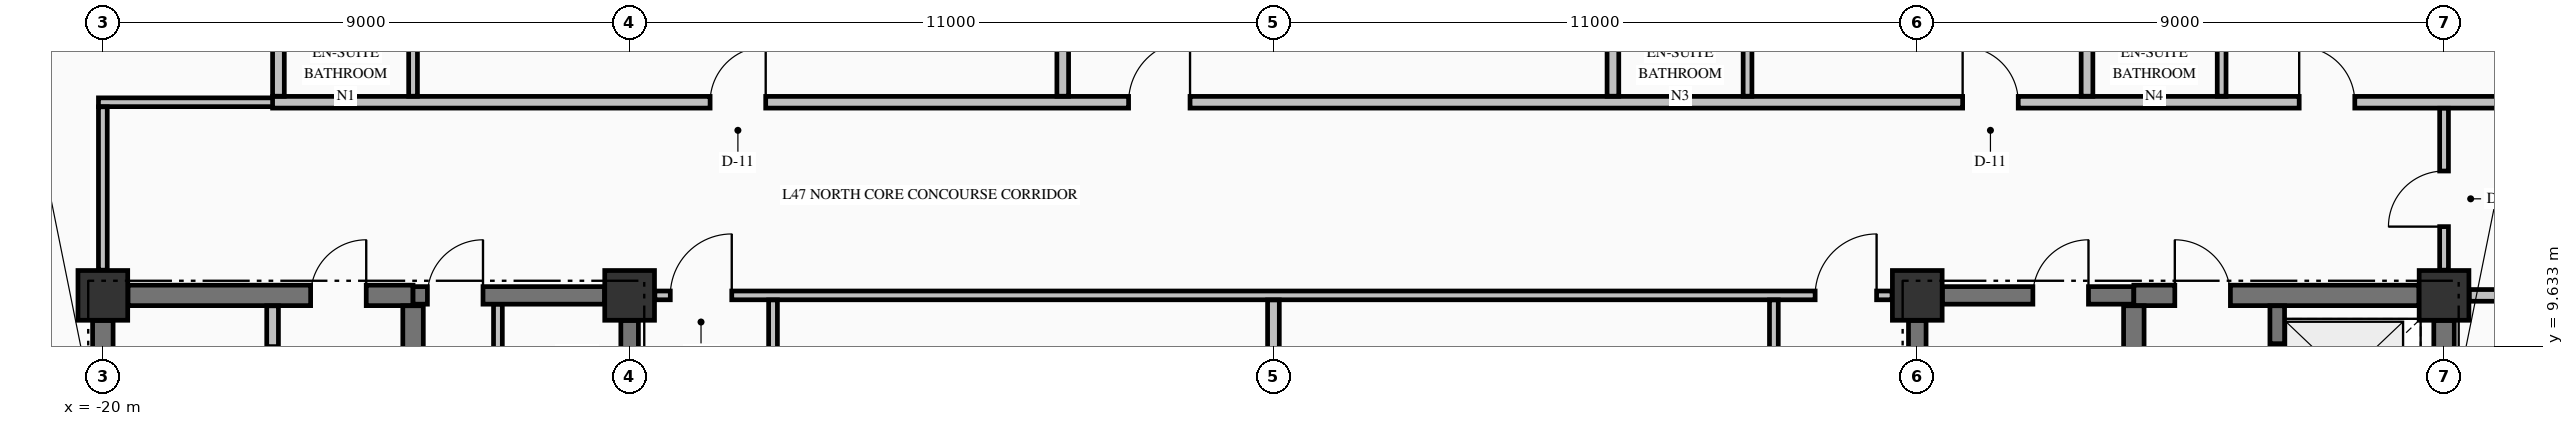
"""IFC4 building model, lengths in metres.
Left out: names, types, materials, properties, quantities, classifications, styles, units other than length and angle.
Written with IfcOpenShell. Run it as: python <this file> out.ifc"""

import sys

from ifc_helpers import new_model, si_unit, direction, frame, frame_2d, origin, origin_2d, place, context, subcontext, project, spatial, rectangle, extrude, element, fill, save


model = new_model("IFC4")
c1 = context("Model", 3, precision=1e-05, world=origin(), true_north=direction((0.0, 1.0)))
c2 = subcontext(c1, "Body", "Model", "MODEL_VIEW")
j1 = project(units=[si_unit("LENGTHUNIT", "METRE"), si_unit("PLANEANGLEUNIT", "RADIAN")], contexts=[c1])
p1 = place(None, origin())
s1 = spatial("IfcSite", under=j1, at=p1, CompositionType="ELEMENT")
p2 = place(p1, origin())
s2 = spatial("IfcBuilding", under=s1, at=p2, CompositionType="ELEMENT")
p3 = place(p2, frame((0.0, 0.0, 183.06)))
s3 = spatial("IfcBuildingStorey", under=s2, at=p3, CompositionType="ELEMENT", Elevation=183.06)
for number, where, z_axis, x_axis in (
    (1, (-20.0, 10.5, -0.25), (0.0, 0.0, 1.0), (1.0, 0.0, 0.0)),
    (2, (-11.0, 10.5, -0.25), (0.0, 0.0, 1.0), (1.0, 0.0, 0.0)),
    (3, (11.0, 10.5, -0.25), (0.0, 0.0, 1.0), (1.0, 0.0, 0.0)),
    (4, (20.0, 10.5, -0.25), (0.0, 0.0, 1.0), (1.0, 0.0, 0.0)),
):
    element("IfcColumn", number, at=place(p3, frame(where, z_axis=z_axis, x_axis=x_axis)), inside=s3, PredefinedType="COLUMN", context=c2, shape_type="SweptSolid", body=[
        extrude(rectangle(XDim=0.85, YDim=0.85, at=origin_2d()), origin(), (0.0, 0.0, 1.0), 3.225),
    ])
p4 = place(p3, frame((-19.571, 10.5, 0.0), z_axis=(0.0, 0.0, 1.0), x_axis=(1.0, 0.0, 0.0)))
e5 = element("IfcWall", 5, at=p4, inside=s3, PredefinedType="SHEAR", context=c2, shape_type="SweptSolid", body=[
    extrude(rectangle(XDim=4.871, YDim=0.35, at=frame_2d((2.436, 0.0))), origin(), (0.0, 0.0, 1.0), 2.975),
])
p5 = place(p4, frame((3.121, 0.0, 0.0)))
e6 = element("IfcOpeningElement", 6, at=p5, cuts=e5, PredefinedType="OPENING", context=c2, shape_type="SweptSolid", body=[
    extrude(rectangle(XDim=0.95, YDim=2.02, at=frame_2d((0.475, 1.01))), frame((0.0, 0.185, 0.0), z_axis=(0.0, -1.0, 0.0), x_axis=(1.0, 0.0, 0.0)), (0.0, 0.0, 1.0), 0.37),
])
p6 = place(p3, frame((-14.7, 10.5, 0.0), z_axis=(0.0, 0.0, 1.0), x_axis=(1.0, 0.0, 0.0)))
e7 = element("IfcWall", 7, at=p6, inside=s3, PredefinedType="SHEAR", context=c2, shape_type="SweptSolid", body=[
    extrude(rectangle(XDim=3.271, YDim=0.3, at=frame_2d((1.635, 0.0))), origin(), (0.0, 0.0, 1.0), 2.975),
])
p7 = place(p6, frame((0.245, 0.0, 0.0)))
e8 = element("IfcOpeningElement", 8, at=p7, cuts=e7, PredefinedType="OPENING", context=c2, shape_type="SweptSolid", body=[
    extrude(rectangle(XDim=0.95, YDim=2.02, at=frame_2d((0.475, 1.01))), frame((0.0, 0.16, 0.0), z_axis=(0.0, -1.0, 0.0), x_axis=(1.0, 0.0, 0.0)), (0.0, 0.0, 1.0), 0.32),
])
p8 = place(p3, frame((11.429, 10.5, 0.0), z_axis=(0.0, 0.0, 1.0), x_axis=(1.0, 0.0, 0.0)))
e9 = element("IfcWall", 9, at=p8, inside=s3, PredefinedType="SHEAR", context=c2, shape_type="SweptSolid", body=[
    extrude(rectangle(XDim=3.271, YDim=0.3, at=frame_2d((1.635, 0.0))), origin(), (0.0, 0.0, 1.0), 2.975),
])
p9 = place(p8, frame((1.546, 0.0, 0.0)))
e10 = element("IfcOpeningElement", 10, at=p9, cuts=e9, PredefinedType="OPENING", context=c2, shape_type="SweptSolid", body=[
    extrude(rectangle(XDim=0.95, YDim=2.02, at=frame_2d((0.475, 1.01))), frame((0.0, 0.16, 0.0), z_axis=(0.0, -1.0, 0.0), x_axis=(1.0, 0.0, 0.0)), (0.0, 0.0, 1.0), 0.32),
])
p10 = place(p3, frame((14.7, 10.5, 0.0), z_axis=(0.0, 0.0, 1.0), x_axis=(1.0, 0.0, 0.0)))
e11 = element("IfcWall", 11, at=p10, inside=s3, PredefinedType="SHEAR", context=c2, shape_type="SweptSolid", body=[
    extrude(rectangle(XDim=4.871, YDim=0.35, at=frame_2d((2.436, 0.0))), origin(), (0.0, 0.0, 1.0), 2.975),
])
p11 = place(p10, frame((0.7, 0.0, 0.0)))
e12 = element("IfcOpeningElement", 12, at=p11, cuts=e11, PredefinedType="OPENING", context=c2, shape_type="SweptSolid", body=[
    extrude(rectangle(XDim=0.95, YDim=2.02, at=frame_2d((0.475, 1.01))), frame((0.0, 0.185, 0.0), z_axis=(0.0, -1.0, 0.0), x_axis=(1.0, 0.0, 0.0)), (0.0, 0.0, 1.0), 0.37),
])
p12 = place(p3, frame((-10.569, 10.5, 0.0), z_axis=(0.0, 0.0, 1.0), x_axis=(1.0, 0.0, 0.0)))
e13 = element("IfcWall", 13, at=p12, inside=s3, PredefinedType="PARTITIONING", context=c2, shape_type="SweptSolid", body=[
    extrude(rectangle(XDim=21.138, YDim=0.15, at=frame_2d((10.569, 0.0))), origin(), (0.0, 0.0, 1.0), 2.975),
])
p13 = place(p12, frame((0.264, 0.0, 0.0)))
e14 = element("IfcOpeningElement", 14, at=p13, cuts=e13, PredefinedType="OPENING", context=c2, shape_type="SweptSolid", body=[
    extrude(rectangle(XDim=1.05, YDim=2.15, at=frame_2d((0.525, 1.075))), frame((0.0, 0.085, 0.0), z_axis=(0.0, -1.0, 0.0), x_axis=(1.0, 0.0, 0.0)), (0.0, 0.0, 1.0), 0.17),
])
p14 = place(p12, frame((19.824, 0.0, 0.0)))
e15 = element("IfcOpeningElement", 15, at=p14, cuts=e13, PredefinedType="OPENING", context=c2, shape_type="SweptSolid", body=[
    extrude(rectangle(XDim=1.05, YDim=2.15, at=frame_2d((0.525, 1.075))), frame((0.0, 0.085, 0.0), z_axis=(0.0, -1.0, 0.0), x_axis=(1.0, 0.0, 0.0)), (0.0, 0.0, 1.0), 0.17),
])
p15 = place(p3, frame((20.431, 10.5, 0.0), z_axis=(0.0, 0.0, 1.0), x_axis=(1.0, 0.0, 0.0)))
e16 = element("IfcWall", 16, at=p15, inside=s3, PredefinedType="PARTITIONING", context=c2, shape_type="SweptSolid", body=[
    extrude(rectangle(XDim=6.404, YDim=0.2, at=frame_2d((3.202, 0.0))), origin(), (0.0, 0.0, 1.0), 2.975),
])
p16 = place(p15, frame((2.594, 0.0, 0.0)))
e17 = element("IfcOpeningElement", 17, at=p16, cuts=e16, PredefinedType="OPENING", context=c2, shape_type="SweptSolid", body=[
    extrude(rectangle(XDim=0.95, YDim=2.15, at=frame_2d((0.475, 1.075))), frame((0.0, 0.11, 0.0), z_axis=(0.0, -1.0, 0.0), x_axis=(1.0, 0.0, 0.0)), (0.0, 0.0, 1.0), 0.22),
])
p17 = place(p3, frame((-20.075, 13.8, 0.0), z_axis=(0.0, 0.0, 1.0), x_axis=(1.0, 0.0, 0.0)))
e18 = element("IfcWall", 18, at=p17, inside=s3, PredefinedType="PARTITIONING", context=c2, shape_type="SweptSolid", body=[
    extrude(rectangle(XDim=3.175, YDim=0.15, at=frame_2d((1.587, 0.0))), origin(), (0.0, 0.0, 1.0), 2.975),
])
p18 = place(p3, frame((-17.1, 13.8, 0.0), z_axis=(0.0, 0.0, 1.0), x_axis=(1.0, 0.0, 0.0)))
e19 = element("IfcWall", 19, at=p18, inside=s3, PredefinedType="PARTITIONING", context=c2, shape_type="SweptSolid", body=[
    extrude(rectangle(XDim=39.2, YDim=0.2, at=frame_2d((19.6, 0.0))), origin(), (0.0, 0.0, 1.0), 2.975),
])
p19 = place(p18, frame((7.475, 0.0, 0.0)))
e20 = element("IfcOpeningElement", 20, at=p19, cuts=e19, PredefinedType="OPENING", context=c2, shape_type="SweptSolid", body=[
    extrude(rectangle(XDim=0.95, YDim=2.15, at=frame_2d((0.475, 1.075))), frame((0.0, 0.11, 0.0), z_axis=(0.0, -1.0, 0.0), x_axis=(1.0, 0.0, 0.0)), (0.0, 0.0, 1.0), 0.22),
])
p20 = place(p18, frame((14.625, 0.0, 0.0)))
e21 = element("IfcOpeningElement", 21, at=p20, cuts=e19, PredefinedType="OPENING", context=c2, shape_type="SweptSolid", body=[
    extrude(rectangle(XDim=1.05, YDim=2.15, at=frame_2d((0.525, 1.075))), frame((0.0, 0.11, 0.0), z_axis=(0.0, -1.0, 0.0), x_axis=(1.0, 0.0, 0.0)), (0.0, 0.0, 1.0), 0.22),
])
p21 = place(p18, frame((28.875, 0.0, 0.0)))
e22 = element("IfcOpeningElement", 22, at=p21, cuts=e19, PredefinedType="OPENING", context=c2, shape_type="SweptSolid", body=[
    extrude(rectangle(XDim=0.95, YDim=2.15, at=frame_2d((0.475, 1.075))), frame((0.0, 0.11, 0.0), z_axis=(0.0, -1.0, 0.0), x_axis=(1.0, 0.0, 0.0)), (0.0, 0.0, 1.0), 0.22),
])
p22 = place(p18, frame((34.625, 0.0, 0.0)))
e23 = element("IfcOpeningElement", 23, at=p22, cuts=e19, PredefinedType="OPENING", context=c2, shape_type="SweptSolid", body=[
    extrude(rectangle(XDim=0.95, YDim=2.15, at=frame_2d((0.475, 1.075))), frame((0.0, 0.11, 0.0), z_axis=(0.0, -1.0, 0.0), x_axis=(1.0, 0.0, 0.0)), (0.0, 0.0, 1.0), 0.22),
])
p23 = place(p3, frame((-20.0, 5.327, 0.0), z_axis=(0.0, 0.0, 1.0), x_axis=(0.0, 1.0, 0.0)))
e24 = element("IfcWall", 24, at=p23, inside=s3, PredefinedType="SHEAR", context=c2, shape_type="SweptSolid", body=[
    extrude(rectangle(XDim=4.744, YDim=0.35, at=frame_2d((2.372, 0.0))), origin(), (0.0, 0.0, 1.0), 2.975),
])
p24 = place(p3, frame((-14.7, 5.852, 0.0), z_axis=(0.0, 0.0, 1.0), x_axis=(0.0, 1.0, 0.0)))
e25 = element("IfcWall", 25, at=p24, inside=s3, PredefinedType="SHEAR", context=c2, shape_type="SweptSolid", body=[
    extrude(rectangle(XDim=4.471, YDim=0.35, at=frame_2d((2.235, 0.0))), origin(), (0.0, 0.0, 1.0), 2.975),
])
for number, where, z_axis, x_axis in (
    (26, (-11.0, 5.852, 0.0), (0.0, 0.0, 1.0), (0.0, 1.0, 0.0)),
    (27, (11.0, 5.852, 0.0), (0.0, 0.0, 1.0), (0.0, 1.0, 0.0)),
):
    element("IfcWall", number, at=place(p3, frame(where, z_axis=z_axis, x_axis=x_axis)), inside=s3, PredefinedType="SHEAR", context=c2, shape_type="SweptSolid", body=[
        extrude(rectangle(XDim=4.219, YDim=0.3, at=frame_2d((2.109, 0.0))), origin(), (0.0, 0.0, 1.0), 2.975),
    ])
p25 = place(p3, frame((14.7, 5.852, 0.0), z_axis=(0.0, 0.0, 1.0), x_axis=(0.0, 1.0, 0.0)))
e28 = element("IfcWall", 28, at=p25, inside=s3, PredefinedType="SHEAR", context=c2, shape_type="SweptSolid", body=[
    extrude(rectangle(XDim=4.471, YDim=0.35, at=frame_2d((2.235, 0.0))), origin(), (0.0, 0.0, 1.0), 2.975),
])
p26 = place(p3, frame((17.15, 7.877, 0.0), z_axis=(0.0, 0.0, 1.0), x_axis=(0.0, 1.0, 0.0)))
e29 = element("IfcWall", 29, at=p26, inside=s3, PredefinedType="SOLIDWALL", context=c2, shape_type="SweptSolid", body=[
    extrude(rectangle(XDim=2.446, YDim=0.25, at=frame_2d((1.223, 0.0))), origin(), (0.0, 0.0, 1.0), 2.975),
])
p27 = place(p26, frame((0.698, 0.0, 0.0)))
e30 = element("IfcOpeningElement", 30, at=p27, cuts=e29, PredefinedType="OPENING", context=c2, shape_type="SweptSolid", body=[
    extrude(rectangle(XDim=1.1, YDim=2.2, at=frame_2d((0.55, 1.1))), frame((0.0, 0.135, 0.0), z_axis=(0.0, -1.0, 0.0), x_axis=(1.0, 0.0, 0.0)), (0.0, 0.0, 1.0), 0.27),
])
p28 = place(p3, frame((20.0, 7.877, 0.0), z_axis=(0.0, 0.0, 1.0), x_axis=(0.0, 1.0, 0.0)))
e31 = element("IfcWall", 31, at=p28, inside=s3, PredefinedType="SHEAR", context=c2, shape_type="SweptSolid", body=[
    extrude(rectangle(XDim=2.194, YDim=0.35, at=frame_2d((1.097, 0.0))), origin(), (0.0, 0.0, 1.0), 2.975),
])
p29 = place(p3, frame((-20.0, 10.931, 0.0), z_axis=(0.0, 0.0, 1.0), x_axis=(0.0, 1.0, 0.0)))
e32 = element("IfcWall", 32, at=p29, inside=s3, PredefinedType="PARTITIONING", context=c2, shape_type="SweptSolid", body=[
    extrude(rectangle(XDim=2.791, YDim=0.15, at=frame_2d((1.396, 0.0))), origin(), (0.0, 0.0, 1.0), 2.167),
])
p30 = place(p3, frame((-17.1, 7.928, 0.0), z_axis=(0.0, 0.0, 1.0), x_axis=(0.0, 1.0, 0.0)))
e33 = element("IfcWall", 33, at=p30, inside=s3, PredefinedType="PARTITIONING", context=c2, shape_type="SweptSolid", body=[
    extrude(rectangle(XDim=2.394, YDim=0.2, at=frame_2d((1.197, 0.0))), origin(), (0.0, 0.0, 1.0), 2.975),
])
p31 = place(p30, frame((0.747, 0.0, 0.0)))
e34 = element("IfcOpeningElement", 34, at=p31, cuts=e33, PredefinedType="OPENING", context=c2, shape_type="SweptSolid", body=[
    extrude(rectangle(XDim=0.95, YDim=2.15, at=frame_2d((0.475, 1.075))), frame((0.0, 0.11, 0.0), z_axis=(0.0, -1.0, 0.0), x_axis=(1.0, 0.0, 0.0)), (0.0, 0.0, 1.0), 0.22),
])
p32 = place(p3, frame((-17.0, 13.903, 0.0), z_axis=(0.0, 0.0, 1.0), x_axis=(0.0, 1.0, 0.0)))
e35 = element("IfcWall", 35, at=p32, inside=s3, PredefinedType="PARTITIONING", context=c2, shape_type="SweptSolid", body=[
    extrude(rectangle(XDim=2.069, YDim=0.2, at=frame_2d((1.034, 0.0))), origin(), (0.0, 0.0, 1.0), 2.975),
])
p33 = place(p3, frame((-14.7, 13.903, 0.0), z_axis=(0.0, 0.0, 1.0), x_axis=(0.0, 1.0, 0.0)))
e36 = element("IfcWall", 36, at=p33, inside=s3, PredefinedType="PARTITIONING", context=c2, shape_type="SweptSolid", body=[
    extrude(rectangle(XDim=2.069, YDim=0.15, at=frame_2d((1.034, 0.0))), origin(), (0.0, 0.0, 1.0), 2.975),
])
p34 = place(p3, frame((-13.25, 5.853, 0.0), z_axis=(0.0, 0.0, 1.0), x_axis=(0.0, 1.0, 0.0)))
e37 = element("IfcWall", 37, at=p34, inside=s3, PredefinedType="PARTITIONING", context=c2, shape_type="SweptSolid", body=[
    extrude(rectangle(XDim=4.494, YDim=0.15, at=frame_2d((2.247, 0.0))), origin(), (0.0, 0.0, 1.0), 2.975),
])
p35 = place(p34, frame((1.472, 0.0, 0.0)))
e38 = element("IfcOpeningElement", 38, at=p35, cuts=e37, PredefinedType="OPENING", context=c2, shape_type="SweptSolid", body=[
    extrude(rectangle(XDim=0.95, YDim=2.15, at=frame_2d((0.475, 1.075))), frame((0.0, 0.085, 0.0), z_axis=(0.0, -1.0, 0.0), x_axis=(1.0, 0.0, 0.0)), (0.0, 0.0, 1.0), 0.17),
])
p36 = place(p3, frame((-8.55, 3.303, 0.0), z_axis=(0.0, 0.0, 1.0), x_axis=(0.0, 1.0, 0.0)))
e39 = element("IfcWall", 39, at=p36, inside=s3, PredefinedType="PARTITIONING", context=c2, shape_type="SweptSolid", body=[
    extrude(rectangle(XDim=7.119, YDim=0.15, at=frame_2d((3.56, 0.0))), origin(), (0.0, 0.0, 1.0), 2.975),
])
p37 = place(p36, frame((2.997, 0.0, 0.0)))
e40 = element("IfcOpeningElement", 40, at=p37, cuts=e39, PredefinedType="OPENING", context=c2, shape_type="SweptSolid", body=[
    extrude(rectangle(XDim=1.1, YDim=2.15, at=frame_2d((0.55, 1.075))), frame((0.0, 0.085, 0.0), z_axis=(0.0, -1.0, 0.0), x_axis=(1.0, 0.0, 0.0)), (0.0, 0.0, 1.0), 0.17),
])
p38 = place(p3, frame((-3.6, 13.903, 0.0), z_axis=(0.0, 0.0, 1.0), x_axis=(0.0, 1.0, 0.0)))
e41 = element("IfcWall", 41, at=p38, inside=s3, PredefinedType="PARTITIONING", context=c2, shape_type="SweptSolid", body=[
    extrude(rectangle(XDim=10.432, YDim=0.2, at=frame_2d((5.216, 0.0))), origin(), (0.0, 0.0, 1.0), 2.975),
])
p39 = place(p3, frame((0.0, 9.431, 0.0), z_axis=(0.0, 0.0, 1.0), x_axis=(0.0, 1.0, 0.0)))
e42 = element("IfcWall", 42, at=p39, inside=s3, PredefinedType="PARTITIONING", context=c2, shape_type="SweptSolid", body=[
    extrude(rectangle(XDim=0.991, YDim=0.2, at=frame_2d((0.496, 0.0))), origin(), (0.0, 0.0, 1.0), 2.167),
])
p40 = place(p3, frame((5.8, 13.903, 0.0), z_axis=(0.0, 0.0, 1.0), x_axis=(0.0, 1.0, 0.0)))
e43 = element("IfcWall", 43, at=p40, inside=s3, PredefinedType="PARTITIONING", context=c2, shape_type="SweptSolid", body=[
    extrude(rectangle(XDim=2.069, YDim=0.2, at=frame_2d((1.034, 0.0))), origin(), (0.0, 0.0, 1.0), 2.975),
])
p41 = place(p3, frame((8.1, 13.903, 0.0), z_axis=(0.0, 0.0, 1.0), x_axis=(0.0, 1.0, 0.0)))
e44 = element("IfcWall", 44, at=p41, inside=s3, PredefinedType="PARTITIONING", context=c2, shape_type="SweptSolid", body=[
    extrude(rectangle(XDim=2.069, YDim=0.15, at=frame_2d((1.034, 0.0))), origin(), (0.0, 0.0, 1.0), 2.975),
])
p42 = place(p3, frame((8.55, -1.497, 0.0), z_axis=(0.0, 0.0, 1.0), x_axis=(0.0, 1.0, 0.0)))
e45 = element("IfcWall", 45, at=p42, inside=s3, PredefinedType="PARTITIONING", context=c2, shape_type="SweptSolid", body=[
    extrude(rectangle(XDim=11.919, YDim=0.15, at=frame_2d((5.959, 0.0))), origin(), (0.0, 0.0, 1.0), 2.975),
])
p43 = place(p42, frame((5.397, 0.0, 0.0)))
e46 = element("IfcOpeningElement", 46, at=p43, cuts=e45, PredefinedType="OPENING", context=c2, shape_type="SweptSolid", body=[
    extrude(rectangle(XDim=1.1, YDim=2.15, at=frame_2d((0.55, 1.075))), frame((0.0, 0.085, 0.0), z_axis=(0.0, -1.0, 0.0), x_axis=(1.0, 0.0, 0.0)), (0.0, 0.0, 1.0), 0.17),
])
p44 = place(p3, frame((13.9, 13.903, 0.0), z_axis=(0.0, 0.0, 1.0), x_axis=(0.0, 1.0, 0.0)))
e47 = element("IfcWall", 47, at=p44, inside=s3, PredefinedType="PARTITIONING", context=c2, shape_type="SweptSolid", body=[
    extrude(rectangle(XDim=2.069, YDim=0.2, at=frame_2d((1.034, 0.0))), origin(), (0.0, 0.0, 1.0), 2.975),
])
p45 = place(p3, frame((16.2, 13.903, 0.0), z_axis=(0.0, 0.0, 1.0), x_axis=(0.0, 1.0, 0.0)))
e48 = element("IfcWall", 48, at=p45, inside=s3, PredefinedType="PARTITIONING", context=c2, shape_type="SweptSolid", body=[
    extrude(rectangle(XDim=2.069, YDim=0.15, at=frame_2d((1.034, 0.0))), origin(), (0.0, 0.0, 1.0), 2.975),
])
p46 = place(p3, frame((20.0, 10.931, 0.0), z_axis=(0.0, 0.0, 1.0), x_axis=(0.0, 1.0, 0.0)))
e49 = element("IfcWall", 49, at=p46, inside=s3, PredefinedType="PARTITIONING", context=c2, shape_type="SweptSolid", body=[
    extrude(rectangle(XDim=2.766, YDim=0.15, at=frame_2d((1.383, 0.0))), origin(), (0.0, 0.0, 1.0), 2.167),
])
p47 = place(p46, frame((0.744, 0.0, 0.0)))
e50 = element("IfcOpeningElement", 50, at=p47, cuts=e49, PredefinedType="OPENING", context=c2, shape_type="SweptSolid", body=[
    extrude(rectangle(XDim=0.95, YDim=2.02, at=frame_2d((0.475, 1.01))), frame((0.0, 0.085, 0.0), z_axis=(0.0, -1.0, 0.0), x_axis=(1.0, 0.0, 0.0)), (0.0, 0.0, 1.0), 0.17),
])
p48 = place(p7, origin())
e51 = element("IfcDoor", 51, at=p48, inside=s3, OperationType="SINGLE_SWING_RIGHT", PredefinedType="DOOR", context=c2, shape_type="SweptSolid", body=[
    extrude(rectangle(XDim=0.95, YDim=2.02, at=frame_2d((0.475, 1.01))), frame((0.0, 0.025, 0.0), z_axis=(0.0, -1.0, 0.0), x_axis=(1.0, 0.0, 0.0)), (0.0, 0.0, 1.0), 0.05),
])
fill(e8, e51)
p49 = place(p9, origin())
e52 = element("IfcDoor", 52, at=p49, inside=s3, OperationType="SINGLE_SWING_RIGHT", PredefinedType="DOOR", context=c2, shape_type="SweptSolid", body=[
    extrude(rectangle(XDim=0.95, YDim=2.02, at=frame_2d((0.475, 1.01))), frame((0.0, 0.025, 0.0), z_axis=(0.0, -1.0, 0.0), x_axis=(1.0, 0.0, 0.0)), (0.0, 0.0, 1.0), 0.05),
])
fill(e10, e52)
p50 = place(p5, origin())
e53 = element("IfcDoor", 53, at=p50, inside=s3, OperationType="SINGLE_SWING_RIGHT", PredefinedType="DOOR", context=c2, shape_type="SweptSolid", body=[
    extrude(rectangle(XDim=0.95, YDim=2.02, at=frame_2d((0.475, 1.01))), frame((0.0, 0.025, 0.0), z_axis=(0.0, -1.0, 0.0), x_axis=(1.0, 0.0, 0.0)), (0.0, 0.0, 1.0), 0.05),
])
fill(e6, e53)
p51 = place(p27, origin())
e54 = element("IfcDoor", 54, at=p51, inside=s3, OperationType="SLIDING_TO_RIGHT", PredefinedType="DOOR", context=c2, shape_type="SweptSolid", body=[
    extrude(rectangle(XDim=1.1, YDim=2.2, at=frame_2d((0.55, 1.1))), frame((0.0, 0.025, 0.0), z_axis=(0.0, -1.0, 0.0), x_axis=(1.0, 0.0, 0.0)), (0.0, 0.0, 1.0), 0.05),
])
fill(e30, e54)
p52 = place(p11, origin())
e55 = element("IfcDoor", 55, at=p52, inside=s3, OperationType="SINGLE_SWING_LEFT", PredefinedType="DOOR", context=c2, shape_type="SweptSolid", body=[
    extrude(rectangle(XDim=0.95, YDim=2.02, at=frame_2d((0.475, 1.01))), frame((0.0, 0.025, 0.0), z_axis=(0.0, -1.0, 0.0), x_axis=(1.0, 0.0, 0.0)), (0.0, 0.0, 1.0), 0.05),
])
fill(e12, e55)
p53 = place(p13, origin())
e56 = element("IfcDoor", 56, at=p53, inside=s3, OperationType="SINGLE_SWING_RIGHT", PredefinedType="DOOR", context=c2, shape_type="SweptSolid", body=[
    extrude(rectangle(XDim=1.05, YDim=2.15, at=frame_2d((0.525, 1.075))), frame((0.0, 0.025, 0.0), z_axis=(0.0, -1.0, 0.0), x_axis=(1.0, 0.0, 0.0)), (0.0, 0.0, 1.0), 0.05),
])
fill(e14, e56)
p54 = place(p14, origin())
e57 = element("IfcDoor", 57, at=p54, inside=s3, OperationType="SINGLE_SWING_RIGHT", PredefinedType="DOOR", context=c2, shape_type="SweptSolid", body=[
    extrude(rectangle(XDim=1.05, YDim=2.15, at=frame_2d((0.525, 1.075))), frame((0.0, 0.025, 0.0), z_axis=(0.0, -1.0, 0.0), x_axis=(1.0, 0.0, 0.0)), (0.0, 0.0, 1.0), 0.05),
])
fill(e15, e57)
p55 = place(p19, origin())
e58 = element("IfcDoor", 58, at=p55, inside=s3, OperationType="SINGLE_SWING_RIGHT", PredefinedType="DOOR", context=c2, shape_type="SweptSolid", body=[
    extrude(rectangle(XDim=0.95, YDim=2.15, at=frame_2d((0.475, 1.075))), frame((0.0, 0.025, 0.0), z_axis=(0.0, -1.0, 0.0), x_axis=(1.0, 0.0, 0.0)), (0.0, 0.0, 1.0), 0.05),
])
fill(e20, e58)
p56 = place(p20, origin())
e59 = element("IfcDoor", 59, at=p56, inside=s3, OperationType="SINGLE_SWING_RIGHT", PredefinedType="DOOR", context=c2, shape_type="SweptSolid", body=[
    extrude(rectangle(XDim=1.05, YDim=2.15, at=frame_2d((0.525, 1.075))), frame((0.0, 0.025, 0.0), z_axis=(0.0, -1.0, 0.0), x_axis=(1.0, 0.0, 0.0)), (0.0, 0.0, 1.0), 0.05),
])
fill(e21, e59)
p57 = place(p21, origin())
e60 = element("IfcDoor", 60, at=p57, inside=s3, OperationType="SINGLE_SWING_LEFT", PredefinedType="DOOR", context=c2, shape_type="SweptSolid", body=[
    extrude(rectangle(XDim=0.95, YDim=2.15, at=frame_2d((0.475, 1.075))), frame((0.0, 0.025, 0.0), z_axis=(0.0, -1.0, 0.0), x_axis=(1.0, 0.0, 0.0)), (0.0, 0.0, 1.0), 0.05),
])
fill(e22, e60)
p58 = place(p22, origin())
e61 = element("IfcDoor", 61, at=p58, inside=s3, OperationType="SINGLE_SWING_LEFT", PredefinedType="DOOR", context=c2, shape_type="SweptSolid", body=[
    extrude(rectangle(XDim=0.95, YDim=2.15, at=frame_2d((0.475, 1.075))), frame((0.0, 0.025, 0.0), z_axis=(0.0, -1.0, 0.0), x_axis=(1.0, 0.0, 0.0)), (0.0, 0.0, 1.0), 0.05),
])
fill(e23, e61)
p59 = place(p47, origin())
e62 = element("IfcDoor", 62, at=p59, inside=s3, OperationType="SINGLE_SWING_LEFT", PredefinedType="DOOR", context=c2, shape_type="SweptSolid", body=[
    extrude(rectangle(XDim=0.95, YDim=2.02, at=frame_2d((0.475, 1.01))), frame((0.0, 0.025, 0.0), z_axis=(0.0, -1.0, 0.0), x_axis=(1.0, 0.0, 0.0)), (0.0, 0.0, 1.0), 0.05),
])
fill(e50, e62)
save(model, sys.argv[1])
